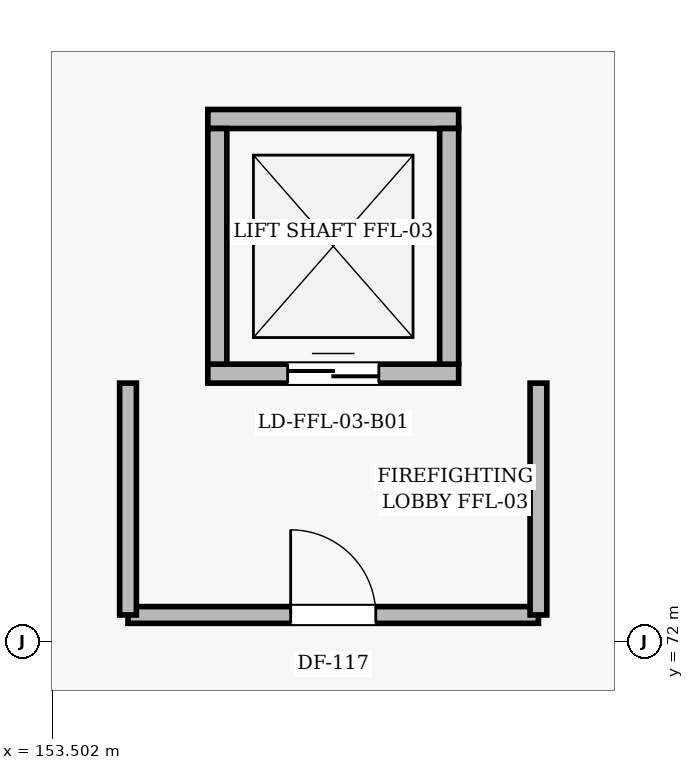
"""IFC4 building model, lengths in metres.
Left out: names, types, materials, properties, quantities, classifications, styles, units other than length and angle.
Written with IfcOpenShell. Run it as: python <this file> out.ifc"""

import sys

from ifc_helpers import new_model, si_unit, direction, frame, frame_2d, origin, place, context, subcontext, project, spatial, rectangle, extrude, element, fill, save


model = new_model("IFC4")
c1 = context("Model", 3, precision=1e-05, world=origin(), true_north=direction((0.0, 1.0)))
c2 = subcontext(c1, "Body", "Model", "MODEL_VIEW")
j1 = project(units=[si_unit("LENGTHUNIT", "METRE"), si_unit("PLANEANGLEUNIT", "RADIAN")], contexts=[c1])
p1 = place(None, origin())
s1 = spatial("IfcSite", under=j1, at=p1, CompositionType="ELEMENT")
p2 = place(p1, origin())
s2 = spatial("IfcBuilding", under=s1, at=p2, CompositionType="ELEMENT")
p3 = place(p2, frame((0.0, 0.0, -5.4)))
s3 = spatial("IfcBuildingStorey", under=s2, at=p3, CompositionType="ELEMENT", Elevation=-5.4)
p4 = place(p3, frame((155.55, 75.525, 0.0), z_axis=(0.0, 0.0, 1.0), x_axis=(1.0, 0.0, 0.0)))
e1 = element("IfcWall", 1, at=p4, inside=s3, PredefinedType="SOLIDWALL", context=c2, shape_type="SweptSolid", body=[
    extrude(rectangle(XDim=3.3, YDim=0.25, at=frame_2d((1.65, 0.0))), origin(), (0.0, 0.0, 1.0), 5.1),
])
p5 = place(p4, frame((1.05, 0.0, 0.0)))
e2 = element("IfcOpeningElement", 2, at=p5, cuts=e1, PredefinedType="OPENING", context=c2, shape_type="SweptSolid", body=[
    extrude(rectangle(XDim=1.2, YDim=2.25, at=frame_2d((0.6, 1.125))), frame((0.0, 0.135, 0.0), z_axis=(0.0, -1.0, 0.0), x_axis=(1.0, 0.0, 0.0)), (0.0, 0.0, 1.0), 0.27),
])
p6 = place(p3, frame((158.85, 78.875, 0.0), z_axis=(0.0, 0.0, 1.0), x_axis=(-1.0, 0.0, 0.0)))
e3 = element("IfcWall", 3, at=p6, inside=s3, PredefinedType="SOLIDWALL", context=c2, shape_type="SweptSolid", body=[
    extrude(rectangle(XDim=3.3, YDim=0.25, at=frame_2d((1.65, 0.0))), origin(), (0.0, 0.0, 1.0), 5.1),
])
for number, where, z_axis, x_axis in (
    (4, (155.675, 78.75, 0.0), (0.0, 0.0, 1.0), (0.0, -1.0, 0.0)),
    (5, (158.725, 75.65, 0.0), (0.0, 0.0, 1.0), (0.0, 1.0, 0.0)),
):
    element("IfcWall", number, at=place(p3, frame(where, z_axis=z_axis, x_axis=x_axis)), inside=s3, PredefinedType="SOLIDWALL", context=c2, shape_type="SweptSolid", body=[
        extrude(rectangle(XDim=3.1, YDim=0.25, at=frame_2d((1.55, 0.0))), origin(), (0.0, 0.0, 1.0), 5.1),
    ])
p7 = place(p3, frame((154.5, 72.35, 0.0), z_axis=(0.0, 0.0, 1.0), x_axis=(1.0, 0.0, 0.0)))
e6 = element("IfcWall", 6, at=p7, inside=s3, PredefinedType="SOLIDWALL", context=c2, shape_type="SweptSolid", body=[
    extrude(rectangle(XDim=5.4, YDim=0.22, at=frame_2d((2.7, 0.0))), origin(), (0.0, 0.0, 1.0), 4.514),
])
p8 = place(p7, frame((2.14, 0.0, 0.0)))
e7 = element("IfcOpeningElement", 7, at=p8, cuts=e6, PredefinedType="OPENING", context=c2, shape_type="SweptSolid", body=[
    extrude(rectangle(XDim=1.12, YDim=2.2, at=frame_2d((0.56, 1.1))), frame((0.0, 0.12, 0.0), z_axis=(0.0, -1.0, 0.0), x_axis=(1.0, 0.0, 0.0)), (0.0, 0.0, 1.0), 0.24),
])
for number, where, z_axis, x_axis in (
    (8, (154.5, 72.35, 0.0), (0.0, 0.0, 1.0), (0.0, 1.0, 0.0)),
    (9, (159.9, 72.35, 0.0), (0.0, 0.0, 1.0), (0.0, 1.0, 0.0)),
):
    element("IfcWall", number, at=place(p3, frame(where, z_axis=z_axis, x_axis=x_axis)), inside=s3, PredefinedType="SOLIDWALL", context=c2, shape_type="SweptSolid", body=[
        extrude(rectangle(XDim=3.05, YDim=0.22, at=frame_2d((1.525, 0.0))), origin(), (0.0, 0.0, 1.0), 4.514),
    ])
p9 = place(p5, origin())
e10 = element("IfcDoor", 10, at=p9, inside=s3, OperationType="DOUBLE_DOOR_SLIDING", PredefinedType="DOOR", context=c2, shape_type="SweptSolid", body=[
    extrude(rectangle(XDim=1.2, YDim=2.25, at=frame_2d((0.6, 1.125))), frame((0.0, 0.025, 0.0), z_axis=(0.0, -1.0, 0.0), x_axis=(1.0, 0.0, 0.0)), (0.0, 0.0, 1.0), 0.05),
])
fill(e2, e10)
p10 = place(p8, origin())
e11 = element("IfcDoor", 11, at=p10, inside=s3, OperationType="SINGLE_SWING_LEFT", PredefinedType="DOOR", context=c2, shape_type="SweptSolid", body=[
    extrude(rectangle(XDim=1.12, YDim=2.2, at=frame_2d((0.56, 1.1))), frame((0.0, 0.025, 0.0), z_axis=(0.0, -1.0, 0.0), x_axis=(1.0, 0.0, 0.0)), (0.0, 0.0, 1.0), 0.05),
])
fill(e7, e11)
save(model, sys.argv[1])
